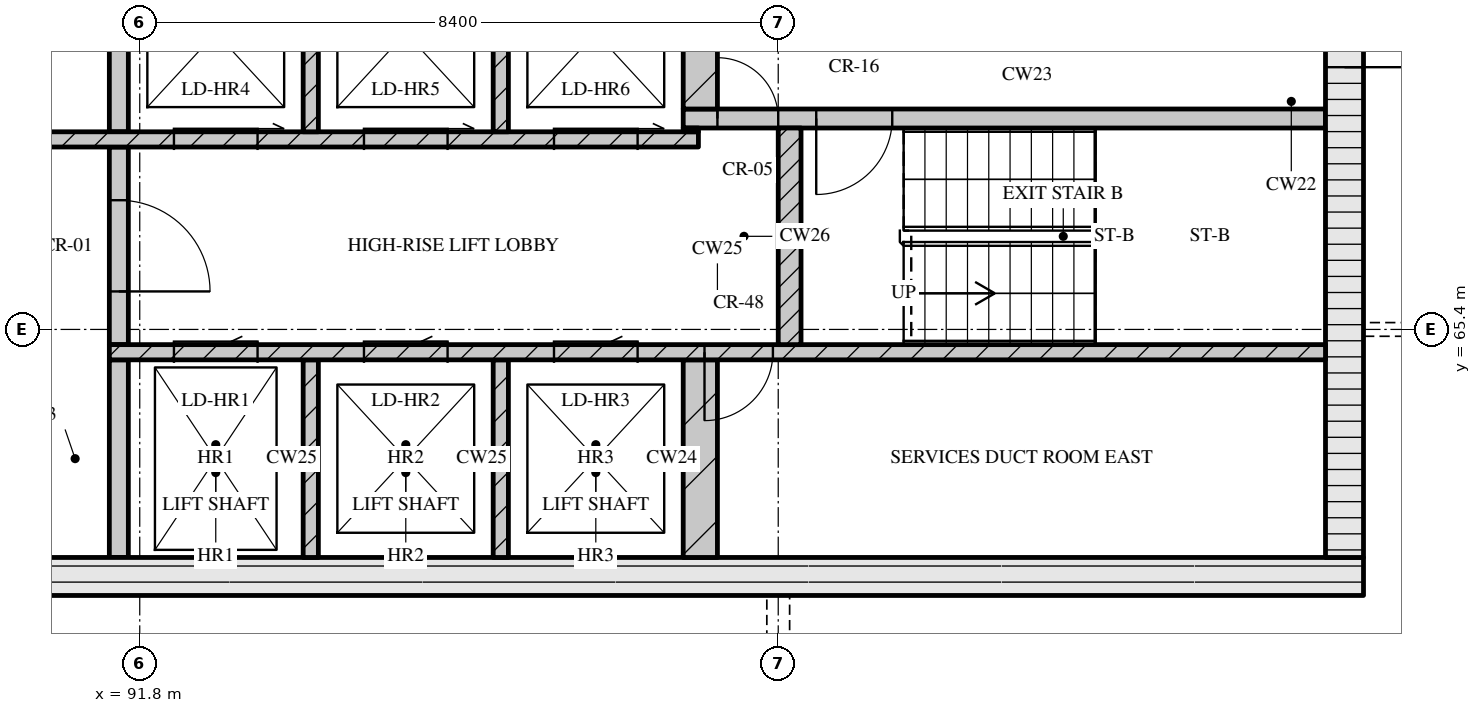
"""IFC4 building model, lengths in metres.
Left out: names, types, materials, properties, quantities, classifications, styles, units other than length and angle.
Written with IfcOpenShell. Run it as: python <this file> out.ifc"""

import sys

from ifc_helpers import new_model, si_unit, direction, frame, frame_2d, origin, place, context, subcontext, project, spatial, rectangle, extrude, element, fill, save


model = new_model("IFC4")
c1 = context("Model", 3, precision=1e-05, world=origin(), true_north=direction((0.0, 1.0)))
c2 = subcontext(c1, "Body", "Model", "MODEL_VIEW")
j1 = project(units=[si_unit("LENGTHUNIT", "METRE"), si_unit("PLANEANGLEUNIT", "RADIAN")], contexts=[c1])
p1 = place(None, origin())
s1 = spatial("IfcSite", under=j1, at=p1, CompositionType="ELEMENT")
p2 = place(p1, origin())
s2 = spatial("IfcBuilding", under=s1, at=p2, CompositionType="ELEMENT")
p3 = place(p2, frame((0.0, 0.0, 281.55)))
s3 = spatial("IfcBuildingStorey", under=s2, at=p3, CompositionType="ELEMENT", Elevation=281.55)
p4 = place(p3, frame((67.3, 62.15, 0.0), z_axis=(0.0, 0.0, 1.0), x_axis=(1.0, 0.0, 0.0)))
e1 = element("IfcWall", 1, at=p4, inside=s3, PredefinedType="SOLIDWALL", context=c2, shape_type="SweptSolid", body=[
    extrude(rectangle(XDim=40.6, YDim=0.5, at=frame_2d((20.3, 0.0))), origin(), (0.0, 0.0, 1.0), 3.32),
])
p5 = place(p4, frame((20.65, 0.0, 0.0)))
e2 = element("IfcOpeningElement", 2, at=p5, cuts=e1, PredefinedType="OPENING", context=c2, shape_type="SweptSolid", body=[
    extrude(rectangle(XDim=1.8, YDim=2.1, at=frame_2d((0.9, 1.05))), frame((0.0, 0.26, 0.0), z_axis=(0.0, -1.0, 0.0), x_axis=(1.0, 0.0, 0.0)), (0.0, 0.0, 1.0), 0.52),
])
p6 = place(p3, frame((107.65, 62.4, 0.0), z_axis=(0.0, 0.0, 1.0), x_axis=(0.0, 1.0, 0.0)))
e3 = element("IfcWall", 3, at=p6, inside=s3, PredefinedType="SOLIDWALL", context=c2, shape_type="SweptSolid", body=[
    extrude(rectangle(XDim=12.0, YDim=0.5, at=frame_2d((6.0, 0.0))), origin(), (0.0, 0.0, 1.0), 3.32),
])
p7 = place(p6, frame((6.45, 0.0, 0.0)))
e4 = element("IfcOpeningElement", 4, at=p7, cuts=e3, PredefinedType="OPENING", context=c2, shape_type="SweptSolid", body=[
    extrude(rectangle(XDim=1.2, YDim=2.1, at=frame_2d((0.6, 1.05))), frame((0.0, 0.26, 0.0), z_axis=(0.0, -1.0, 0.0), x_axis=(1.0, 0.0, 0.0)), (0.0, 0.0, 1.0), 0.52),
])
p8 = place(p3, frame((91.525, 62.4, 0.0), z_axis=(0.0, 0.0, 1.0), x_axis=(0.0, 1.0, 0.0)))
e5 = element("IfcWall", 5, at=p8, inside=s3, PredefinedType="SOLIDWALL", context=c2, shape_type="SweptSolid", body=[
    extrude(rectangle(XDim=2.6, YDim=0.25, at=frame_2d((1.3, 0.0))), origin(), (0.0, 0.0, 1.0), 3.32),
])
for number, where, z_axis, x_axis in (
    (6, (94.05, 62.4, 0.0), (0.0, 0.0, 1.0), (0.0, 1.0, 0.0)),
    (7, (96.55, 62.4, 0.0), (0.0, 0.0, 1.0), (0.0, 1.0, 0.0)),
):
    element("IfcWall", number, at=place(p3, frame(where, z_axis=z_axis, x_axis=x_axis)), inside=s3, PredefinedType="SOLIDWALL", context=c2, shape_type="SweptSolid", body=[
        extrude(rectangle(XDim=2.6, YDim=0.2, at=frame_2d((1.3, 0.0))), origin(), (0.0, 0.0, 1.0), 3.32),
    ])
p9 = place(p3, frame((99.175, 62.4, 0.0), z_axis=(0.0, 0.0, 1.0), x_axis=(0.0, 1.0, 0.0)))
e8 = element("IfcWall", 8, at=p9, inside=s3, PredefinedType="SOLIDWALL", context=c2, shape_type="SweptSolid", body=[
    extrude(rectangle(XDim=2.6, YDim=0.45, at=frame_2d((1.3, 0.0))), origin(), (0.0, 0.0, 1.0), 3.32),
])
p10 = place(p3, frame((91.4, 65.1, 0.0), z_axis=(0.0, 0.0, 1.0), x_axis=(1.0, 0.0, 0.0)))
e9 = element("IfcWall", 9, at=p10, inside=s3, PredefinedType="SOLIDWALL", context=c2, shape_type="SweptSolid", body=[
    extrude(rectangle(XDim=16.0, YDim=0.2, at=frame_2d((8.0, 0.0))), origin(), (0.0, 0.0, 1.0), 3.32),
])
p11 = place(p10, frame((0.85, 0.0, 0.0)))
e10 = element("IfcOpeningElement", 10, at=p11, cuts=e9, PredefinedType="OPENING", context=c2, shape_type="SweptSolid", body=[
    extrude(rectangle(XDim=1.1, YDim=2.1, at=frame_2d((0.55, 1.05))), frame((0.0, 0.11, 0.0), z_axis=(0.0, -1.0, 0.0), x_axis=(1.0, 0.0, 0.0)), (0.0, 0.0, 1.0), 0.22),
])
p12 = place(p10, frame((3.35, 0.0, 0.0)))
e11 = element("IfcOpeningElement", 11, at=p12, cuts=e9, PredefinedType="OPENING", context=c2, shape_type="SweptSolid", body=[
    extrude(rectangle(XDim=1.1, YDim=2.1, at=frame_2d((0.55, 1.05))), frame((0.0, 0.11, 0.0), z_axis=(0.0, -1.0, 0.0), x_axis=(1.0, 0.0, 0.0)), (0.0, 0.0, 1.0), 0.22),
])
p13 = place(p10, frame((5.85, 0.0, 0.0)))
e12 = element("IfcOpeningElement", 12, at=p13, cuts=e9, PredefinedType="OPENING", context=c2, shape_type="SweptSolid", body=[
    extrude(rectangle(XDim=1.1, YDim=2.1, at=frame_2d((0.55, 1.05))), frame((0.0, 0.11, 0.0), z_axis=(0.0, -1.0, 0.0), x_axis=(1.0, 0.0, 0.0)), (0.0, 0.0, 1.0), 0.22),
])
p14 = place(p10, frame((7.83, 0.0, 0.0)))
e13 = element("IfcOpeningElement", 13, at=p14, cuts=e9, PredefinedType="OPENING", context=c2, shape_type="SweptSolid", body=[
    extrude(rectangle(XDim=0.9, YDim=2.1, at=frame_2d((0.45, 1.05))), frame((0.0, 0.11, 0.0), z_axis=(0.0, -1.0, 0.0), x_axis=(1.0, 0.0, 0.0)), (0.0, 0.0, 1.0), 0.22),
])
p15 = place(p3, frame((91.525, 65.2, 0.0), z_axis=(0.0, 0.0, 1.0), x_axis=(0.0, 1.0, 0.0)))
e14 = element("IfcWall", 14, at=p15, inside=s3, PredefinedType="SOLIDWALL", context=c2, shape_type="SweptSolid", body=[
    extrude(rectangle(XDim=2.6, YDim=0.25, at=frame_2d((1.3, 0.0))), origin(), (0.0, 0.0, 1.0), 3.32),
])
p16 = place(p15, frame((0.7, 0.0, 0.0)))
e15 = element("IfcOpeningElement", 15, at=p16, cuts=e14, PredefinedType="OPENING", context=c2, shape_type="SweptSolid", body=[
    extrude(rectangle(XDim=1.2, YDim=2.1, at=frame_2d((0.6, 1.05))), frame((0.0, 0.135, 0.0), z_axis=(0.0, -1.0, 0.0), x_axis=(1.0, 0.0, 0.0)), (0.0, 0.0, 1.0), 0.27),
])
p17 = place(p3, frame((100.35, 65.2, 0.0), z_axis=(0.0, 0.0, 1.0), x_axis=(0.0, 1.0, 0.0)))
e16 = element("IfcWall", 16, at=p17, inside=s3, PredefinedType="SOLIDWALL", context=c2, shape_type="SweptSolid", body=[
    extrude(rectangle(XDim=2.85, YDim=0.3, at=frame_2d((1.425, 0.0))), origin(), (0.0, 0.0, 1.0), 3.32),
])
p18 = place(p3, frame((76.05, 67.9, 0.0), z_axis=(0.0, 0.0, 1.0), x_axis=(1.0, 0.0, 0.0)))
e17 = element("IfcWall", 17, at=p18, inside=s3, PredefinedType="SOLIDWALL", context=c2, shape_type="SweptSolid", body=[
    extrude(rectangle(XDim=23.1, YDim=0.2, at=frame_2d((11.55, 0.0))), origin(), (0.0, 0.0, 1.0), 3.32),
])
p19 = place(p18, frame((1.35, 0.0, 0.0)))
e18 = element("IfcOpeningElement", 18, at=p19, cuts=e17, PredefinedType="OPENING", context=c2, shape_type="SweptSolid", body=[
    extrude(rectangle(XDim=0.9, YDim=2.1, at=frame_2d((0.45, 1.05))), frame((0.0, 0.11, 0.0), z_axis=(0.0, -1.0, 0.0), x_axis=(1.0, 0.0, 0.0)), (0.0, 0.0, 1.0), 0.22),
])
p20 = place(p18, frame((5.06, 0.0, 0.0)))
e19 = element("IfcOpeningElement", 19, at=p20, cuts=e17, PredefinedType="OPENING", context=c2, shape_type="SweptSolid", body=[
    extrude(rectangle(XDim=0.9, YDim=2.1, at=frame_2d((0.45, 1.05))), frame((0.0, 0.11, 0.0), z_axis=(0.0, -1.0, 0.0), x_axis=(1.0, 0.0, 0.0)), (0.0, 0.0, 1.0), 0.22),
])
p21 = place(p18, frame((8.45, 0.0, 0.0)))
e20 = element("IfcOpeningElement", 20, at=p21, cuts=e17, PredefinedType="OPENING", context=c2, shape_type="SweptSolid", body=[
    extrude(rectangle(XDim=0.9, YDim=2.1, at=frame_2d((0.45, 1.05))), frame((0.0, 0.11, 0.0), z_axis=(0.0, -1.0, 0.0), x_axis=(1.0, 0.0, 0.0)), (0.0, 0.0, 1.0), 0.22),
])
p22 = place(p18, frame((10.91, 0.0, 0.0)))
e21 = element("IfcOpeningElement", 21, at=p22, cuts=e17, PredefinedType="OPENING", context=c2, shape_type="SweptSolid", body=[
    extrude(rectangle(XDim=0.9, YDim=2.1, at=frame_2d((0.45, 1.05))), frame((0.0, 0.11, 0.0), z_axis=(0.0, -1.0, 0.0), x_axis=(1.0, 0.0, 0.0)), (0.0, 0.0, 1.0), 0.22),
])
p23 = place(p18, frame((13.55, 0.0, 0.0)))
e22 = element("IfcOpeningElement", 22, at=p23, cuts=e17, PredefinedType="OPENING", context=c2, shape_type="SweptSolid", body=[
    extrude(rectangle(XDim=1.0, YDim=2.1, at=frame_2d((0.5, 1.05))), frame((0.0, 0.11, 0.0), z_axis=(0.0, -1.0, 0.0), x_axis=(1.0, 0.0, 0.0)), (0.0, 0.0, 1.0), 0.22),
])
p24 = place(p18, frame((16.2, 0.0, 0.0)))
e23 = element("IfcOpeningElement", 23, at=p24, cuts=e17, PredefinedType="OPENING", context=c2, shape_type="SweptSolid", body=[
    extrude(rectangle(XDim=1.1, YDim=2.1, at=frame_2d((0.55, 1.05))), frame((0.0, 0.11, 0.0), z_axis=(0.0, -1.0, 0.0), x_axis=(1.0, 0.0, 0.0)), (0.0, 0.0, 1.0), 0.22),
])
p25 = place(p18, frame((18.7, 0.0, 0.0)))
e24 = element("IfcOpeningElement", 24, at=p25, cuts=e17, PredefinedType="OPENING", context=c2, shape_type="SweptSolid", body=[
    extrude(rectangle(XDim=1.1, YDim=2.1, at=frame_2d((0.55, 1.05))), frame((0.0, 0.11, 0.0), z_axis=(0.0, -1.0, 0.0), x_axis=(1.0, 0.0, 0.0)), (0.0, 0.0, 1.0), 0.22),
])
p26 = place(p18, frame((21.2, 0.0, 0.0)))
e25 = element("IfcOpeningElement", 25, at=p26, cuts=e17, PredefinedType="OPENING", context=c2, shape_type="SweptSolid", body=[
    extrude(rectangle(XDim=1.1, YDim=2.1, at=frame_2d((0.55, 1.05))), frame((0.0, 0.11, 0.0), z_axis=(0.0, -1.0, 0.0), x_axis=(1.0, 0.0, 0.0)), (0.0, 0.0, 1.0), 0.22),
])
p27 = place(p3, frame((91.525, 68.0, 0.0), z_axis=(0.0, 0.0, 1.0), x_axis=(0.0, 1.0, 0.0)))
e26 = element("IfcWall", 26, at=p27, inside=s3, PredefinedType="SOLIDWALL", context=c2, shape_type="SweptSolid", body=[
    extrude(rectangle(XDim=2.6, YDim=0.25, at=frame_2d((1.3, 0.0))), origin(), (0.0, 0.0, 1.0), 3.32),
])
for number, where, z_axis, x_axis in (
    (27, (94.05, 68.0, 0.0), (0.0, 0.0, 1.0), (0.0, 1.0, 0.0)),
    (28, (96.55, 68.0, 0.0), (0.0, 0.0, 1.0), (0.0, 1.0, 0.0)),
):
    element("IfcWall", number, at=place(p3, frame(where, z_axis=z_axis, x_axis=x_axis)), inside=s3, PredefinedType="SOLIDWALL", context=c2, shape_type="SweptSolid", body=[
        extrude(rectangle(XDim=2.6, YDim=0.2, at=frame_2d((1.3, 0.0))), origin(), (0.0, 0.0, 1.0), 3.32),
    ])
p28 = place(p3, frame((98.95, 68.025, 0.0), z_axis=(0.0, 0.0, 1.0), x_axis=(1.0, 0.0, 0.0)))
e29 = element("IfcWall", 29, at=p28, inside=s3, PredefinedType="SOLIDWALL", context=c2, shape_type="SweptSolid", body=[
    extrude(rectangle(XDim=0.2, YDim=0.05, at=frame_2d((0.1, 0.0))), origin(), (0.0, 0.0, 1.0), 3.32),
])
p29 = place(p3, frame((98.95, 68.175, 0.0), z_axis=(0.0, 0.0, 1.0), x_axis=(1.0, 0.0, 0.0)))
e30 = element("IfcWall", 30, at=p29, inside=s3, PredefinedType="SOLIDWALL", context=c2, shape_type="SweptSolid", body=[
    extrude(rectangle(XDim=8.45, YDim=0.25, at=frame_2d((4.225, 0.0))), origin(), (0.0, 0.0, 1.0), 3.32),
])
p30 = place(p29, frame((0.45, 0.0, 0.0)))
e31 = element("IfcOpeningElement", 31, at=p30, cuts=e30, PredefinedType="OPENING", context=c2, shape_type="SweptSolid", body=[
    extrude(rectangle(XDim=0.8, YDim=2.1, at=frame_2d((0.4, 1.05))), frame((0.0, 0.135, 0.0), z_axis=(0.0, -1.0, 0.0), x_axis=(1.0, 0.0, 0.0)), (0.0, 0.0, 1.0), 0.27),
])
p31 = place(p29, frame((1.75, 0.0, 0.0)))
e32 = element("IfcOpeningElement", 32, at=p31, cuts=e30, PredefinedType="OPENING", context=c2, shape_type="SweptSolid", body=[
    extrude(rectangle(XDim=1.0, YDim=2.1, at=frame_2d((0.5, 1.05))), frame((0.0, 0.135, 0.0), z_axis=(0.0, -1.0, 0.0), x_axis=(1.0, 0.0, 0.0)), (0.0, 0.0, 1.0), 0.27),
])
p32 = place(p3, frame((99.175, 68.3, 0.0), z_axis=(0.0, 0.0, 1.0), x_axis=(0.0, 1.0, 0.0)))
e33 = element("IfcWall", 33, at=p32, inside=s3, PredefinedType="SOLIDWALL", context=c2, shape_type="SweptSolid", body=[
    extrude(rectangle(XDim=2.3, YDim=0.45, at=frame_2d((1.15, 0.0))), origin(), (0.0, 0.0, 1.0), 3.32),
])
p33 = place(p11, origin())
e34 = element("IfcDoor", 34, at=p33, inside=s3, OperationType="SLIDING_TO_LEFT", PredefinedType="DOOR", context=c2, shape_type="SweptSolid", body=[
    extrude(rectangle(XDim=1.1, YDim=2.1, at=frame_2d((0.55, 1.05))), frame((0.0, 0.025, 0.0), z_axis=(0.0, -1.0, 0.0), x_axis=(1.0, 0.0, 0.0)), (0.0, 0.0, 1.0), 0.05),
])
fill(e10, e34)
p34 = place(p12, origin())
e35 = element("IfcDoor", 35, at=p34, inside=s3, OperationType="SLIDING_TO_LEFT", PredefinedType="DOOR", context=c2, shape_type="SweptSolid", body=[
    extrude(rectangle(XDim=1.1, YDim=2.1, at=frame_2d((0.55, 1.05))), frame((0.0, 0.025, 0.0), z_axis=(0.0, -1.0, 0.0), x_axis=(1.0, 0.0, 0.0)), (0.0, 0.0, 1.0), 0.05),
])
fill(e11, e35)
p35 = place(p13, origin())
e36 = element("IfcDoor", 36, at=p35, inside=s3, OperationType="SLIDING_TO_LEFT", PredefinedType="DOOR", context=c2, shape_type="SweptSolid", body=[
    extrude(rectangle(XDim=1.1, YDim=2.1, at=frame_2d((0.55, 1.05))), frame((0.0, 0.025, 0.0), z_axis=(0.0, -1.0, 0.0), x_axis=(1.0, 0.0, 0.0)), (0.0, 0.0, 1.0), 0.05),
])
fill(e12, e36)
p36 = place(p14, origin())
e37 = element("IfcDoor", 37, at=p36, inside=s3, OperationType="SINGLE_SWING_RIGHT", PredefinedType="DOOR", context=c2, shape_type="SweptSolid", body=[
    extrude(rectangle(XDim=0.9, YDim=2.1, at=frame_2d((0.45, 1.05))), frame((0.0, 0.025, 0.0), z_axis=(0.0, -1.0, 0.0), x_axis=(1.0, 0.0, 0.0)), (0.0, 0.0, 1.0), 0.05),
])
fill(e13, e37)
p37 = place(p16, origin())
e38 = element("IfcDoor", 38, at=p37, inside=s3, OperationType="SINGLE_SWING_RIGHT", PredefinedType="DOOR", context=c2, shape_type="SweptSolid", body=[
    extrude(rectangle(XDim=1.2, YDim=2.1, at=frame_2d((0.6, 1.05))), frame((0.0, 0.025, 0.0), z_axis=(0.0, -1.0, 0.0), x_axis=(1.0, 0.0, 0.0)), (0.0, 0.0, 1.0), 0.05),
])
fill(e15, e38)
p38 = place(p24, origin())
e39 = element("IfcDoor", 39, at=p38, inside=s3, OperationType="SLIDING_TO_RIGHT", PredefinedType="DOOR", context=c2, shape_type="SweptSolid", body=[
    extrude(rectangle(XDim=1.1, YDim=2.1, at=frame_2d((0.55, 1.05))), frame((0.0, 0.025, 0.0), z_axis=(0.0, -1.0, 0.0), x_axis=(1.0, 0.0, 0.0)), (0.0, 0.0, 1.0), 0.05),
])
fill(e23, e39)
p39 = place(p25, origin())
e40 = element("IfcDoor", 40, at=p39, inside=s3, OperationType="SLIDING_TO_RIGHT", PredefinedType="DOOR", context=c2, shape_type="SweptSolid", body=[
    extrude(rectangle(XDim=1.1, YDim=2.1, at=frame_2d((0.55, 1.05))), frame((0.0, 0.025, 0.0), z_axis=(0.0, -1.0, 0.0), x_axis=(1.0, 0.0, 0.0)), (0.0, 0.0, 1.0), 0.05),
])
fill(e24, e40)
p40 = place(p26, origin())
e41 = element("IfcDoor", 41, at=p40, inside=s3, OperationType="SLIDING_TO_RIGHT", PredefinedType="DOOR", context=c2, shape_type="SweptSolid", body=[
    extrude(rectangle(XDim=1.1, YDim=2.1, at=frame_2d((0.55, 1.05))), frame((0.0, 0.025, 0.0), z_axis=(0.0, -1.0, 0.0), x_axis=(1.0, 0.0, 0.0)), (0.0, 0.0, 1.0), 0.05),
])
fill(e25, e41)
p41 = place(p30, origin())
e42 = element("IfcDoor", 42, at=p41, inside=s3, OperationType="SINGLE_SWING_LEFT", PredefinedType="DOOR", context=c2, shape_type="SweptSolid", body=[
    extrude(rectangle(XDim=0.8, YDim=2.1, at=frame_2d((0.4, 1.05))), frame((0.0, 0.025, 0.0), z_axis=(0.0, -1.0, 0.0), x_axis=(1.0, 0.0, 0.0)), (0.0, 0.0, 1.0), 0.05),
])
fill(e31, e42)
p42 = place(p31, origin())
e43 = element("IfcDoor", 43, at=p42, inside=s3, OperationType="SINGLE_SWING_RIGHT", PredefinedType="DOOR", context=c2, shape_type="SweptSolid", body=[
    extrude(rectangle(XDim=1.0, YDim=2.1, at=frame_2d((0.5, 1.05))), frame((0.0, 0.025, 0.0), z_axis=(0.0, -1.0, 0.0), x_axis=(1.0, 0.0, 0.0)), (0.0, 0.0, 1.0), 0.05),
])
fill(e32, e43)
p43 = place(p7, origin())
e44 = element("IfcDoor", 44, at=p43, inside=s3, OperationType="SINGLE_SWING_RIGHT", PredefinedType="DOOR", context=c2, shape_type="SweptSolid", body=[
    extrude(rectangle(XDim=1.2, YDim=2.1, at=frame_2d((0.6, 1.05))), frame((0.0, 0.025, 0.0), z_axis=(0.0, -1.0, 0.0), x_axis=(1.0, 0.0, 0.0)), (0.0, 0.0, 1.0), 0.05),
])
fill(e4, e44)
save(model, sys.argv[1])
